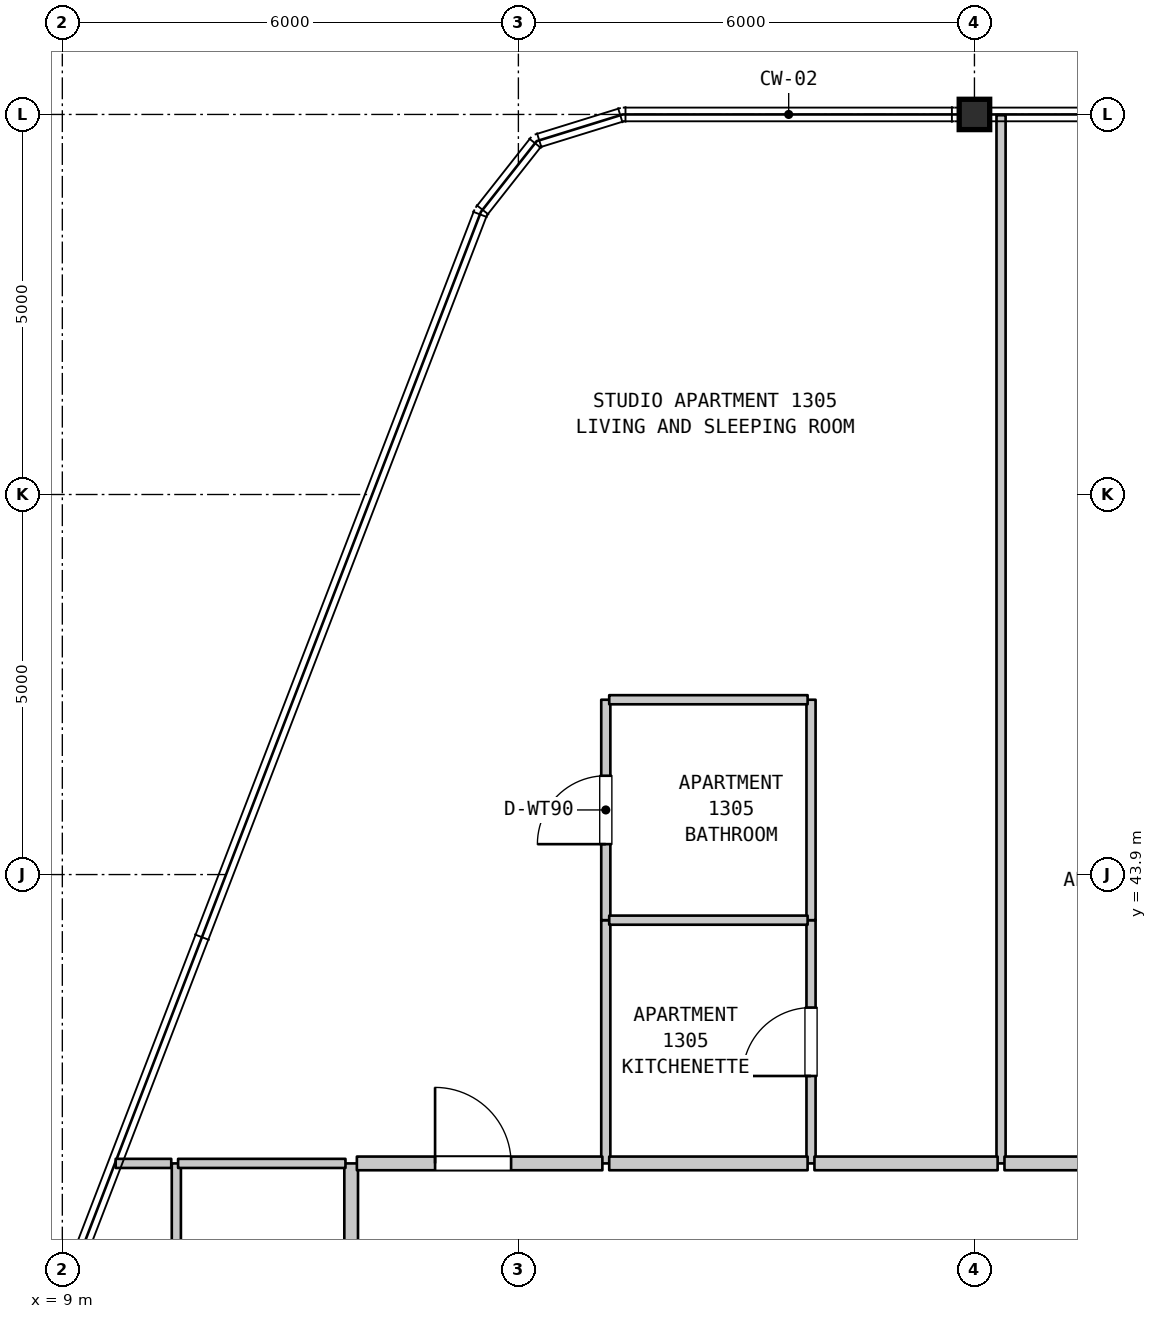
"""IFC4 building model, lengths in metres.
Left out: names, types, materials, properties, quantities, classifications, styles, units other than length and angle.
Written with IfcOpenShell. Run it as: python <this file> out.ifc"""

import sys

from ifc_helpers import new_model, si_unit, direction, frame, frame_2d, origin, origin_2d, place, context, subcontext, project, spatial, rectangle, i_section, extrude, element, fill, save


model = new_model("IFC4")
c1 = context("Model", 3, precision=1e-05, world=origin(), true_north=direction((0.0, 1.0)))
c2 = subcontext(c1, "Body", "Model", "MODEL_VIEW")
j1 = project(units=[si_unit("LENGTHUNIT", "METRE"), si_unit("PLANEANGLEUNIT", "RADIAN")], contexts=[c1])
p1 = place(None, origin())
s1 = spatial("IfcSite", under=j1, at=p1, CompositionType="ELEMENT")
p2 = place(p1, origin())
s2 = spatial("IfcBuilding", under=s1, at=p2, CompositionType="ELEMENT")
p3 = place(p2, frame((0.0, 0.0, 57.3)))
s3 = spatial("IfcBuildingStorey", under=s2, at=p3, CompositionType="ELEMENT", Elevation=57.3)
p4 = place(p3, frame((21.0, 53.9, 0.0), z_axis=(0.0, 0.0, 1.0), x_axis=(1.0, 0.0, 0.0)))
e1 = element("IfcColumn", 1, at=p4, inside=s3, PredefinedType="COLUMN", context=c2, shape_type="SweptSolid", body=[
    extrude(i_section(OverallWidth=0.401, OverallDepth=0.399, WebThickness=0.025, FlangeThickness=0.04, FilletRadius=0.015, at=origin_2d()), origin(), (0.0, 0.0, 1.0), 3.7),
])
p5 = place(p3, frame((10.5, 32.36, 0.0), z_axis=(0.0, 0.0, 1.0), x_axis=(0.0, 1.0, 0.0)))
e2 = element("IfcWall", 2, at=p5, inside=s3, PredefinedType="PARTITIONING", context=c2, shape_type="SweptSolid", body=[
    extrude(rectangle(XDim=7.74, YDim=0.12, at=frame_2d((3.87, 0.0))), origin(), (0.0, 0.0, 1.0), 3.28),
])
p6 = place(p3, frame((12.8, 32.36, 0.0), z_axis=(0.0, 0.0, 1.0), x_axis=(0.0, 1.0, 0.0)))
e3 = element("IfcWall", 3, at=p6, inside=s3, PredefinedType="STANDARD", context=c2, shape_type="SweptSolid", body=[
    extrude(rectangle(XDim=7.74, YDim=0.18, at=frame_2d((3.87, 0.0))), origin(), (0.0, 0.0, 1.0), 3.28),
])
p7 = place(p3, frame((16.15, 40.1, 0.0), z_axis=(0.0, 0.0, 1.0), x_axis=(0.0, 1.0, 0.0)))
e4 = element("IfcWall", 4, at=p7, inside=s3, PredefinedType="PARTITIONING", context=c2, shape_type="SweptSolid", body=[
    extrude(rectangle(XDim=3.2, YDim=0.12, at=frame_2d((1.6, 0.0))), origin(), (0.0, 0.0, 1.0), 3.28),
])
p8 = place(p3, frame((16.15, 43.3, 0.0), z_axis=(0.0, 0.0, 1.0), x_axis=(0.0, 1.0, 0.0)))
e5 = element("IfcWall", 5, at=p8, inside=s3, PredefinedType="PARTITIONING", context=c2, shape_type="SweptSolid", body=[
    extrude(rectangle(XDim=2.9, YDim=0.12, at=frame_2d((1.45, 0.0))), origin(), (0.0, 0.0, 1.0), 3.28),
])
p9 = place(p8, frame((1.0, 0.0, 0.0)))
e6 = element("IfcOpeningElement", 6, at=p9, cuts=e5, PredefinedType="OPENING", context=c2, shape_type="SweptSolid", body=[
    extrude(rectangle(XDim=0.9, YDim=2.1, at=frame_2d((0.45, 1.05))), frame((0.0, 0.07, 0.0), z_axis=(0.0, -1.0, 0.0), x_axis=(1.0, 0.0, 0.0)), (0.0, 0.0, 1.0), 0.14),
])
p10 = place(p3, frame((18.85, 40.1, 0.0), z_axis=(0.0, 0.0, 1.0), x_axis=(0.0, 1.0, 0.0)))
e7 = element("IfcWall", 7, at=p10, inside=s3, PredefinedType="PARTITIONING", context=c2, shape_type="SweptSolid", body=[
    extrude(rectangle(XDim=3.2, YDim=0.12, at=frame_2d((1.6, 0.0))), origin(), (0.0, 0.0, 1.0), 3.28),
])
p11 = place(p10, frame((1.15, 0.0, 0.0)))
e8 = element("IfcOpeningElement", 8, at=p11, cuts=e7, PredefinedType="OPENING", context=c2, shape_type="SweptSolid", body=[
    extrude(rectangle(XDim=0.9, YDim=2.15, at=frame_2d((0.45, 1.075))), frame((0.0, 0.07, 0.0), z_axis=(0.0, -1.0, 0.0), x_axis=(1.0, 0.0, 0.0)), (0.0, 0.0, 1.0), 0.14),
])
p12 = place(p3, frame((18.85, 43.3, 0.0), z_axis=(0.0, 0.0, 1.0), x_axis=(0.0, 1.0, 0.0)))
e9 = element("IfcWall", 9, at=p12, inside=s3, PredefinedType="PARTITIONING", context=c2, shape_type="SweptSolid", body=[
    extrude(rectangle(XDim=2.9, YDim=0.12, at=frame_2d((1.45, 0.0))), origin(), (0.0, 0.0, 1.0), 3.28),
])
p13 = place(p3, frame((21.35, 40.1, 0.0), z_axis=(0.0, 0.0, 1.0), x_axis=(0.0, 1.0, 0.0)))
e10 = element("IfcWall", 10, at=p13, inside=s3, PredefinedType="PARTITIONING", context=c2, shape_type="SweptSolid", body=[
    extrude(rectangle(XDim=13.79, YDim=0.12, at=frame_2d((6.895, 0.0))), origin(), (0.0, 0.0, 1.0), 3.28),
])
p14 = place(p3, frame((9.702, 40.1, 0.0), z_axis=(0.0, 0.0, 1.0), x_axis=(1.0, 0.0, 0.0)))
e11 = element("IfcWall", 11, at=p14, inside=s3, PredefinedType="PARTITIONING", context=c2, shape_type="SweptSolid", body=[
    extrude(rectangle(XDim=0.731, YDim=0.12, at=frame_2d((0.366, 0.0))), origin(), (0.0, 0.0, 1.0), 3.28),
])
p15 = place(p3, frame((10.523, 40.1, 0.0), z_axis=(0.0, 0.0, 1.0), x_axis=(1.0, 0.0, 0.0)))
e12 = element("IfcWall", 12, at=p15, inside=s3, PredefinedType="PARTITIONING", context=c2, shape_type="SweptSolid", body=[
    extrude(rectangle(XDim=2.202, YDim=0.12, at=frame_2d((1.101, 0.0))), origin(), (0.0, 0.0, 1.0), 3.28),
])
p16 = place(p3, frame((12.875, 40.1, 0.0), z_axis=(0.0, 0.0, 1.0), x_axis=(1.0, 0.0, 0.0)))
e13 = element("IfcWall", 13, at=p16, inside=s3, PredefinedType="STANDARD", context=c2, shape_type="SweptSolid", body=[
    extrude(rectangle(XDim=3.23, YDim=0.18, at=frame_2d((1.615, 0.0))), origin(), (0.0, 0.0, 1.0), 3.28),
])
p17 = place(p16, frame((1.029, 0.0, 0.0)))
e14 = element("IfcOpeningElement", 14, at=p17, cuts=e13, PredefinedType="OPENING", context=c2, shape_type="SweptSolid", body=[
    extrude(rectangle(XDim=1.0, YDim=2.15, at=frame_2d((0.5, 1.075))), frame((0.0, 0.1, 0.0), z_axis=(0.0, -1.0, 0.0), x_axis=(1.0, 0.0, 0.0)), (0.0, 0.0, 1.0), 0.2),
])
p18 = place(p3, frame((16.195, 40.1, 0.0), z_axis=(0.0, 0.0, 1.0), x_axis=(1.0, 0.0, 0.0)))
e15 = element("IfcWall", 15, at=p18, inside=s3, PredefinedType="STANDARD", context=c2, shape_type="SweptSolid", body=[
    extrude(rectangle(XDim=2.61, YDim=0.18, at=frame_2d((1.305, 0.0))), origin(), (0.0, 0.0, 1.0), 3.28),
])
p19 = place(p3, frame((18.895, 40.1, 0.0), z_axis=(0.0, 0.0, 1.0), x_axis=(1.0, 0.0, 0.0)))
e16 = element("IfcWall", 16, at=p19, inside=s3, PredefinedType="STANDARD", context=c2, shape_type="SweptSolid", body=[
    extrude(rectangle(XDim=2.41, YDim=0.18, at=frame_2d((1.205, 0.0))), origin(), (0.0, 0.0, 1.0), 3.28),
])
p20 = place(p3, frame((21.395, 40.1, 0.0), z_axis=(0.0, 0.0, 1.0), x_axis=(1.0, 0.0, 0.0)))
e17 = element("IfcWall", 17, at=p20, inside=s3, PredefinedType="STANDARD", context=c2, shape_type="SweptSolid", body=[
    extrude(rectangle(XDim=4.42, YDim=0.18, at=frame_2d((2.21, 0.0))), origin(), (0.0, 0.0, 1.0), 3.28),
])
p21 = place(p20, frame((1.638, 0.0, 0.0)))
e18 = element("IfcOpeningElement", 18, at=p21, cuts=e17, PredefinedType="OPENING", context=c2, shape_type="SweptSolid", body=[
    extrude(rectangle(XDim=1.0, YDim=2.15, at=frame_2d((0.5, 1.075))), frame((0.0, 0.1, 0.0), z_axis=(0.0, -1.0, 0.0), x_axis=(1.0, 0.0, 0.0)), (0.0, 0.0, 1.0), 0.2),
])
for number, where, z_axis, x_axis in (
    (19, (16.195, 43.3, 0.0), (0.0, 0.0, 1.0), (1.0, 0.0, 0.0)),
    (20, (16.195, 46.2, 0.0), (0.0, 0.0, 1.0), (1.0, 0.0, 0.0)),
):
    element("IfcWall", number, at=place(p3, frame(where, z_axis=z_axis, x_axis=x_axis)), inside=s3, PredefinedType="PARTITIONING", context=c2, shape_type="SweptSolid", body=[
        extrude(rectangle(XDim=2.61, YDim=0.12, at=frame_2d((1.305, 0.0))), origin(), (0.0, 0.0, 1.0), 3.28),
    ])
p22 = place(p9, origin())
e21 = element("IfcDoor", 21, at=p22, inside=s3, OperationType="SINGLE_SWING_LEFT", PredefinedType="DOOR", context=c2, shape_type="SweptSolid", body=[
    extrude(rectangle(XDim=0.9, YDim=2.1, at=frame_2d((0.45, 1.05))), frame((0.0, 0.025, 0.0), z_axis=(0.0, -1.0, 0.0), x_axis=(1.0, 0.0, 0.0)), (0.0, 0.0, 1.0), 0.05),
])
fill(e6, e21)
p23 = place(p11, origin())
e22 = element("IfcDoor", 22, at=p23, inside=s3, OperationType="SINGLE_SWING_LEFT", PredefinedType="DOOR", context=c2, shape_type="SweptSolid", body=[
    extrude(rectangle(XDim=0.9, YDim=2.15, at=frame_2d((0.45, 1.075))), frame((0.0, 0.025, 0.0), z_axis=(0.0, -1.0, 0.0), x_axis=(1.0, 0.0, 0.0)), (0.0, 0.0, 1.0), 0.05),
])
fill(e8, e22)
p24 = place(p17, origin())
e23 = element("IfcDoor", 23, at=p24, inside=s3, OperationType="SINGLE_SWING_LEFT", PredefinedType="DOOR", context=c2, shape_type="SweptSolid", body=[
    extrude(rectangle(XDim=1.0, YDim=2.15, at=frame_2d((0.5, 1.075))), frame((0.0, 0.025, 0.0), z_axis=(0.0, -1.0, 0.0), x_axis=(1.0, 0.0, 0.0)), (0.0, 0.0, 1.0), 0.05),
])
fill(e14, e23)
save(model, sys.argv[1])
